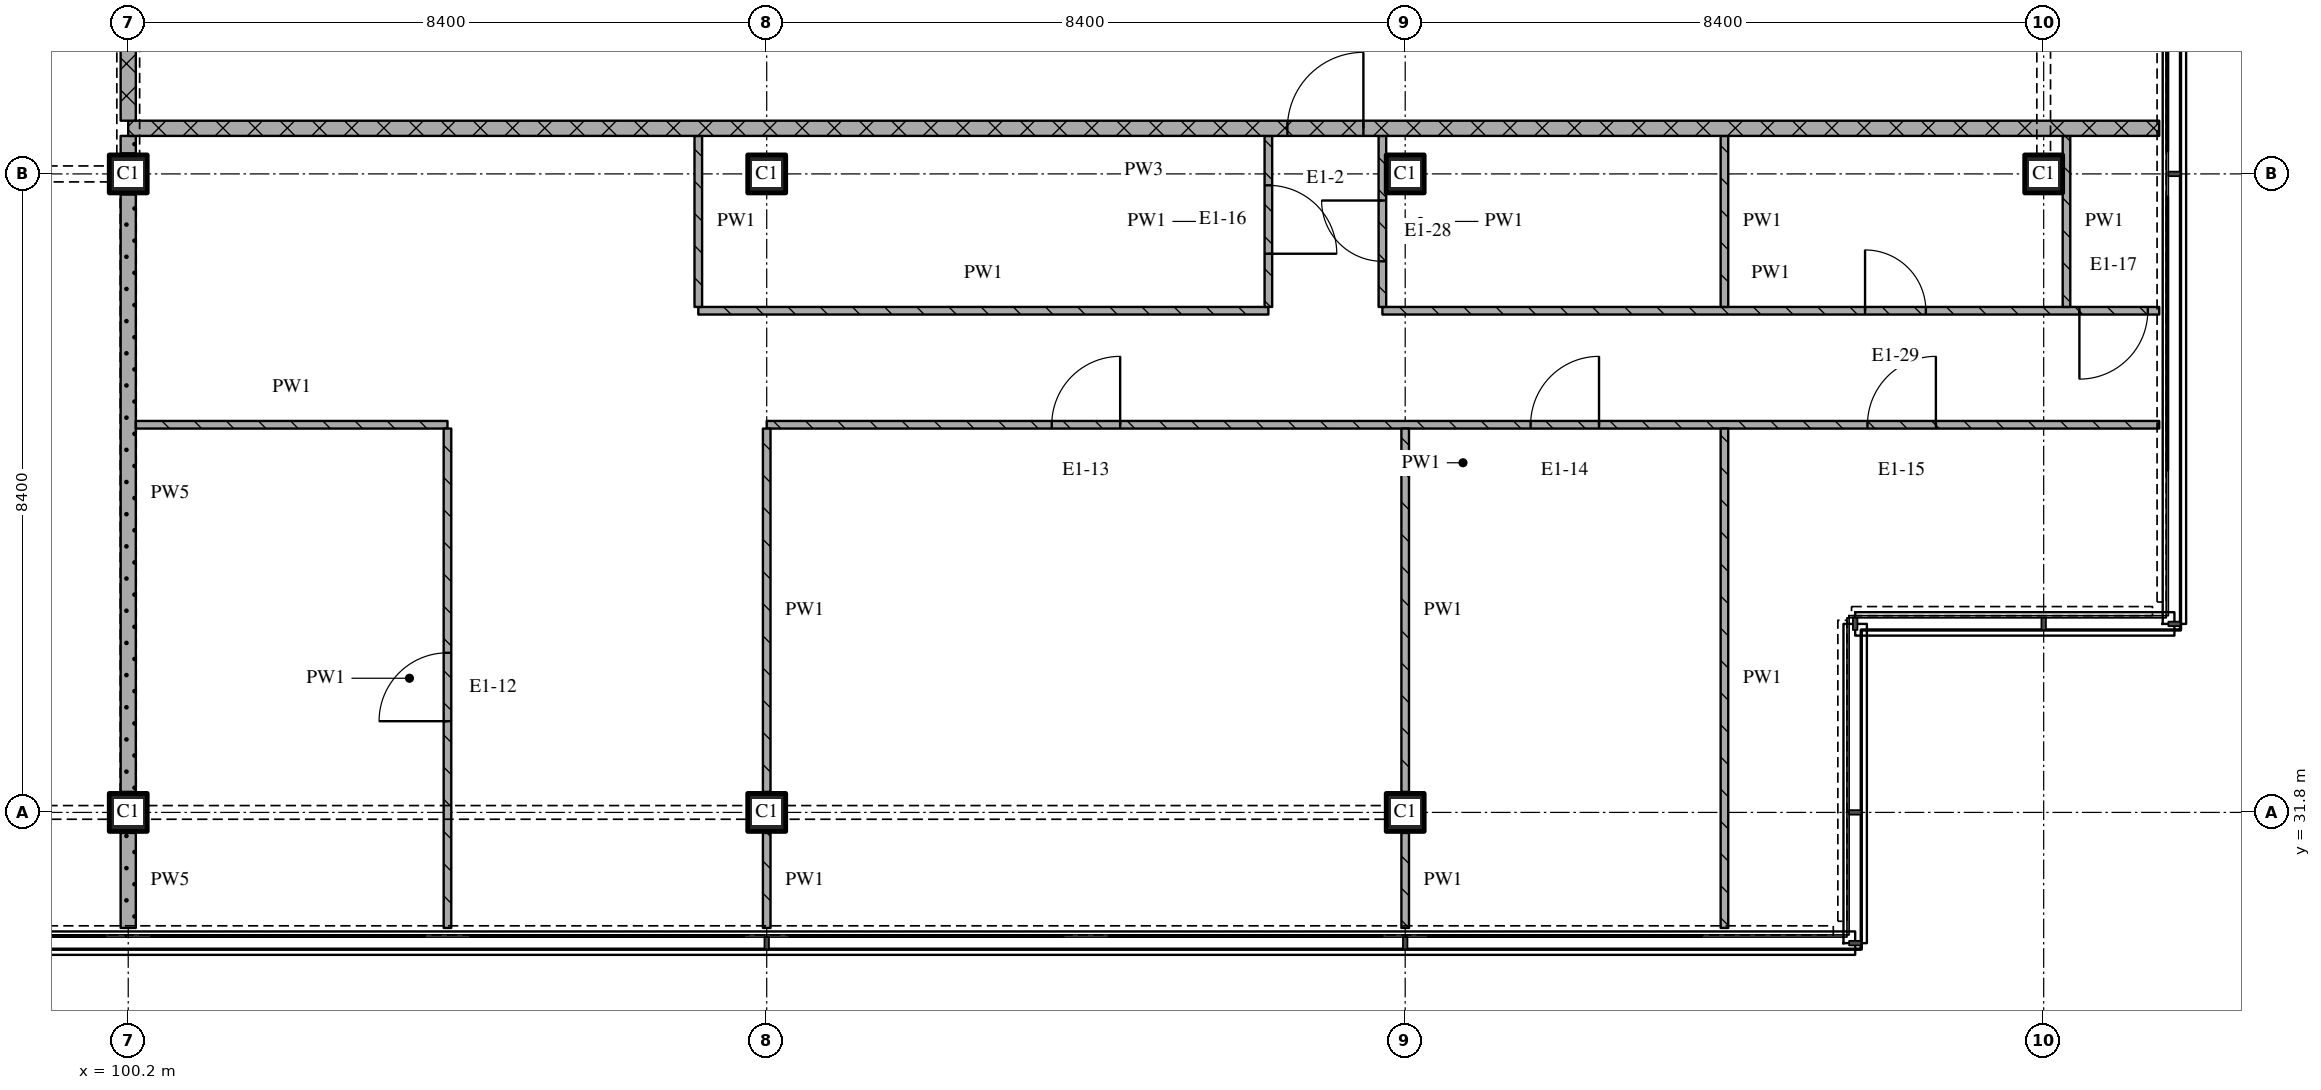
"""IFC4 building model, lengths in metres.
Left out: names, types, materials, properties, quantities, classifications, styles, units other than length and angle.
Written with IfcOpenShell. Run it as: python <this file> out.ifc"""

import sys

from ifc_helpers import new_model, si_unit, direction, frame, frame_2d, origin, origin_2d, place, context, subcontext, project, spatial, rectangle, extrude, element, fill, save


model = new_model("IFC4")
c1 = context("Model", 3, precision=1e-05, world=origin(), true_north=direction((0.0, 1.0)))
c2 = subcontext(c1, "Body", "Model", "MODEL_VIEW")
j1 = project(units=[si_unit("LENGTHUNIT", "METRE"), si_unit("PLANEANGLEUNIT", "RADIAN")], contexts=[c1])
p1 = place(None, origin())
s1 = spatial("IfcSite", under=j1, at=p1, CompositionType="ELEMENT")
p2 = place(p1, origin())
s2 = spatial("IfcBuilding", under=s1, at=p2, CompositionType="ELEMENT")
p3 = place(p2, frame((0.0, 0.0, 267.15)))
s3 = spatial("IfcBuildingStorey", under=s2, at=p3, CompositionType="ELEMENT", Elevation=267.15)
for number, where, z_axis, x_axis in (
    (1, (100.2, 31.8, 0.0), (0.0, 0.0, 1.0), (1.0, 0.0, 0.0)),
    (2, (100.2, 40.2, 0.0), (0.0, 0.0, 1.0), (1.0, 0.0, 0.0)),
    (3, (108.6, 31.8, 0.0), (0.0, 0.0, 1.0), (1.0, 0.0, 0.0)),
    (4, (108.6, 40.2, 0.0), (0.0, 0.0, 1.0), (1.0, 0.0, 0.0)),
    (5, (117.0, 31.8, 0.0), (0.0, 0.0, 1.0), (1.0, 0.0, 0.0)),
    (6, (117.0, 40.2, 0.0), (0.0, 0.0, 1.0), (1.0, 0.0, 0.0)),
    (7, (125.4, 40.2, 0.0), (0.0, 0.0, 1.0), (1.0, 0.0, 0.0)),
):
    element("IfcColumn", number, at=place(p3, frame(where, z_axis=z_axis, x_axis=x_axis)), inside=s3, PredefinedType="COLUMN", context=c2, shape_type="SweptSolid", body=[
        extrude(rectangle(XDim=0.5, YDim=0.5, at=origin_2d()), origin(), (0.0, 0.0, 1.0), 3.6),
    ])
p4 = place(p3, frame((100.3, 36.9, 0.0), z_axis=(0.0, 0.0, 1.0), x_axis=(1.0, 0.0, 0.0)))
e8 = element("IfcWall", 8, at=p4, inside=s3, PredefinedType="PARTITIONING", context=c2, shape_type="SweptSolid", body=[
    extrude(rectangle(XDim=4.1, YDim=0.1, at=frame_2d((2.05, 0.0))), origin(), (0.0, 0.0, 1.0), 3.32),
])
p5 = place(p3, frame((126.92, 36.9, 0.0), z_axis=(0.0, 0.0, 1.0), x_axis=(-1.0, 0.0, 0.0)))
e9 = element("IfcWall", 9, at=p5, inside=s3, PredefinedType="PARTITIONING", context=c2, shape_type="SweptSolid", body=[
    extrude(rectangle(XDim=18.32, YDim=0.1, at=frame_2d((9.16, 0.0))), origin(), (0.0, 0.0, 1.0), 3.32),
])
p6 = place(p5, frame((2.938, 0.0, 0.0)))
e10 = element("IfcOpeningElement", 10, at=p6, cuts=e9, PredefinedType="OPENING", context=c2, shape_type="SweptSolid", body=[
    extrude(rectangle(XDim=0.9, YDim=2.1, at=frame_2d((0.45, 1.05))), frame((0.0, 0.06, 0.0), z_axis=(0.0, -1.0, 0.0), x_axis=(1.0, 0.0, 0.0)), (0.0, 0.0, 1.0), 0.12),
])
p7 = place(p5, frame((7.37, 0.0, 0.0)))
e11 = element("IfcOpeningElement", 11, at=p7, cuts=e9, PredefinedType="OPENING", context=c2, shape_type="SweptSolid", body=[
    extrude(rectangle(XDim=0.9, YDim=2.1, at=frame_2d((0.45, 1.05))), frame((0.0, 0.06, 0.0), z_axis=(0.0, -1.0, 0.0), x_axis=(1.0, 0.0, 0.0)), (0.0, 0.0, 1.0), 0.12),
])
p8 = place(p5, frame((13.67, 0.0, 0.0)))
e12 = element("IfcOpeningElement", 12, at=p8, cuts=e9, PredefinedType="OPENING", context=c2, shape_type="SweptSolid", body=[
    extrude(rectangle(XDim=0.9, YDim=2.1, at=frame_2d((0.45, 1.05))), frame((0.0, 0.06, 0.0), z_axis=(0.0, -1.0, 0.0), x_axis=(1.0, 0.0, 0.0)), (0.0, 0.0, 1.0), 0.12),
])
p9 = place(p3, frame((107.7, 38.4, 0.0), z_axis=(0.0, 0.0, 1.0), x_axis=(1.0, 0.0, 0.0)))
e13 = element("IfcWall", 13, at=p9, inside=s3, PredefinedType="PARTITIONING", context=c2, shape_type="SweptSolid", body=[
    extrude(rectangle(XDim=7.5, YDim=0.1, at=frame_2d((3.75, 0.0))), origin(), (0.0, 0.0, 1.0), 3.32),
])
p10 = place(p3, frame((116.7, 38.4, 0.0), z_axis=(0.0, 0.0, 1.0), x_axis=(1.0, 0.0, 0.0)))
e14 = element("IfcWall", 14, at=p10, inside=s3, PredefinedType="PARTITIONING", context=c2, shape_type="SweptSolid", body=[
    extrude(rectangle(XDim=10.22, YDim=0.1, at=frame_2d((5.11, 0.0))), origin(), (0.0, 0.0, 1.0), 3.32),
])
p11 = place(p10, frame((6.35, 0.0, 0.0)))
e15 = element("IfcOpeningElement", 15, at=p11, cuts=e14, PredefinedType="OPENING", context=c2, shape_type="SweptSolid", body=[
    extrude(rectangle(XDim=0.8, YDim=2.1, at=frame_2d((0.4, 1.05))), frame((0.0, 0.06, 0.0), z_axis=(0.0, -1.0, 0.0), x_axis=(1.0, 0.0, 0.0)), (0.0, 0.0, 1.0), 0.12),
])
p12 = place(p10, frame((9.17, 0.0, 0.0)))
e16 = element("IfcOpeningElement", 16, at=p12, cuts=e14, PredefinedType="OPENING", context=c2, shape_type="SweptSolid", body=[
    extrude(rectangle(XDim=0.9, YDim=2.1, at=frame_2d((0.45, 1.05))), frame((0.0, 0.06, 0.0), z_axis=(0.0, -1.0, 0.0), x_axis=(1.0, 0.0, 0.0)), (0.0, 0.0, 1.0), 0.12),
])
p13 = place(p3, frame((126.92, 40.8, 0.0), z_axis=(0.0, 0.0, 1.0), x_axis=(-1.0, 0.0, 0.0)))
e17 = element("IfcWall", 17, at=p13, inside=s3, PredefinedType="PARTITIONING", context=c2, shape_type="SweptSolid", body=[
    extrude(rectangle(XDim=26.72, YDim=0.2, at=frame_2d((13.36, 0.0))), origin(), (0.0, 0.0, 1.0), 3.32),
])
p14 = place(p13, frame((10.47, 0.0, 0.0)))
e18 = element("IfcOpeningElement", 18, at=p14, cuts=e17, PredefinedType="OPENING", context=c2, shape_type="SweptSolid", body=[
    extrude(rectangle(XDim=1.0, YDim=2.1, at=frame_2d((0.5, 1.05))), frame((0.0, 0.11, 0.0), z_axis=(0.0, -1.0, 0.0), x_axis=(1.0, 0.0, 0.0)), (0.0, 0.0, 1.0), 0.22),
])
p15 = place(p3, frame((100.2, 43.1, 0.0), z_axis=(0.0, 0.0, 1.0), x_axis=(0.0, -1.0, 0.0)))
e19 = element("IfcWall", 19, at=p15, inside=s3, PredefinedType="PARTITIONING", context=c2, shape_type="SweptSolid", body=[
    extrude(rectangle(XDim=2.2, YDim=0.2, at=frame_2d((1.1, 0.0))), origin(), (0.0, 0.0, 1.0), 2.53),
])
p16 = place(p3, frame((100.2, 31.53, 0.0), z_axis=(0.0, 0.0, 1.0), x_axis=(0.0, -1.0, 0.0)))
e20 = element("IfcWall", 20, at=p16, inside=s3, PredefinedType="PARTITIONING", context=c2, shape_type="SweptSolid", body=[
    extrude(rectangle(XDim=1.25, YDim=0.2, at=frame_2d((0.625, 0.0))), origin(), (0.0, 0.0, 1.0), 3.32),
])
p17 = place(p3, frame((100.2, 39.93, 0.0), z_axis=(0.0, 0.0, 1.0), x_axis=(0.0, -1.0, 0.0)))
e21 = element("IfcWall", 21, at=p17, inside=s3, PredefinedType="PARTITIONING", context=c2, shape_type="SweptSolid", body=[
    extrude(rectangle(XDim=7.86, YDim=0.2, at=frame_2d((3.93, 0.0))), origin(), (0.0, 0.0, 1.0), 2.77),
])
p18 = place(p3, frame((100.2, 40.7, 0.0), z_axis=(0.0, 0.0, 1.0), x_axis=(0.0, -1.0, 0.0)))
e22 = element("IfcWall", 22, at=p18, inside=s3, PredefinedType="PARTITIONING", context=c2, shape_type="SweptSolid", body=[
    extrude(rectangle(XDim=0.23, YDim=0.2, at=frame_2d((0.115, 0.0))), origin(), (0.0, 0.0, 1.0), 3.32),
])
p19 = place(p3, frame((104.4, 30.28, 0.0), z_axis=(0.0, 0.0, 1.0), x_axis=(0.0, 1.0, 0.0)))
e23 = element("IfcWall", 23, at=p19, inside=s3, PredefinedType="PARTITIONING", context=c2, shape_type="SweptSolid", body=[
    extrude(rectangle(XDim=6.57, YDim=0.1, at=frame_2d((3.285, 0.0))), origin(), (0.0, 0.0, 1.0), 3.32),
])
p20 = place(p19, frame((2.72, 0.0, 0.0)))
e24 = element("IfcOpeningElement", 24, at=p20, cuts=e23, PredefinedType="OPENING", context=c2, shape_type="SweptSolid", body=[
    extrude(rectangle(XDim=0.9, YDim=2.1, at=frame_2d((0.45, 1.05))), frame((0.0, 0.06, 0.0), z_axis=(0.0, -1.0, 0.0), x_axis=(1.0, 0.0, 0.0)), (0.0, 0.0, 1.0), 0.12),
])
p21 = place(p3, frame((107.7, 40.7, 0.0), z_axis=(0.0, 0.0, 1.0), x_axis=(0.0, -1.0, 0.0)))
e25 = element("IfcWall", 25, at=p21, inside=s3, PredefinedType="PARTITIONING", context=c2, shape_type="SweptSolid", body=[
    extrude(rectangle(XDim=2.25, YDim=0.1, at=frame_2d((1.125, 0.0))), origin(), (0.0, 0.0, 1.0), 3.32),
])
p22 = place(p3, frame((108.6, 31.53, 0.0), z_axis=(0.0, 0.0, 1.0), x_axis=(0.0, -1.0, 0.0)))
e26 = element("IfcWall", 26, at=p22, inside=s3, PredefinedType="PARTITIONING", context=c2, shape_type="SweptSolid", body=[
    extrude(rectangle(XDim=1.25, YDim=0.1, at=frame_2d((0.625, 0.0))), origin(), (0.0, 0.0, 1.0), 3.32),
])
p23 = place(p3, frame((108.6, 36.85, 0.0), z_axis=(0.0, 0.0, 1.0), x_axis=(0.0, -1.0, 0.0)))
e27 = element("IfcWall", 27, at=p23, inside=s3, PredefinedType="PARTITIONING", context=c2, shape_type="SweptSolid", body=[
    extrude(rectangle(XDim=4.78, YDim=0.1, at=frame_2d((2.39, 0.0))), origin(), (0.0, 0.0, 1.0), 3.32),
])
p24 = place(p3, frame((115.2, 38.45, 0.0), z_axis=(0.0, 0.0, 1.0), x_axis=(0.0, 1.0, 0.0)))
e28 = element("IfcWall", 28, at=p24, inside=s3, PredefinedType="PARTITIONING", context=c2, shape_type="SweptSolid", body=[
    extrude(rectangle(XDim=2.25, YDim=0.1, at=frame_2d((1.125, 0.0))), origin(), (0.0, 0.0, 1.0), 3.32),
])
p25 = place(p24, frame((0.7, 0.0, 0.0)))
e29 = element("IfcOpeningElement", 29, at=p25, cuts=e28, PredefinedType="OPENING", context=c2, shape_type="SweptSolid", body=[
    extrude(rectangle(XDim=0.9, YDim=2.1, at=frame_2d((0.45, 1.05))), frame((0.0, 0.06, 0.0), z_axis=(0.0, -1.0, 0.0), x_axis=(1.0, 0.0, 0.0)), (0.0, 0.0, 1.0), 0.12),
])
p26 = place(p3, frame((116.7, 40.7, 0.0), z_axis=(0.0, 0.0, 1.0), x_axis=(0.0, -1.0, 0.0)))
e30 = element("IfcWall", 30, at=p26, inside=s3, PredefinedType="PARTITIONING", context=c2, shape_type="SweptSolid", body=[
    extrude(rectangle(XDim=2.25, YDim=0.1, at=frame_2d((1.125, 0.0))), origin(), (0.0, 0.0, 1.0), 3.32),
])
p27 = place(p26, frame((0.85, 0.0, 0.0)))
e31 = element("IfcOpeningElement", 31, at=p27, cuts=e30, PredefinedType="OPENING", context=c2, shape_type="SweptSolid", body=[
    extrude(rectangle(XDim=0.8, YDim=2.1, at=frame_2d((0.4, 1.05))), frame((0.0, 0.06, 0.0), z_axis=(0.0, -1.0, 0.0), x_axis=(1.0, 0.0, 0.0)), (0.0, 0.0, 1.0), 0.12),
])
p28 = place(p3, frame((117.0, 31.53, 0.0), z_axis=(0.0, 0.0, 1.0), x_axis=(0.0, -1.0, 0.0)))
e32 = element("IfcWall", 32, at=p28, inside=s3, PredefinedType="PARTITIONING", context=c2, shape_type="SweptSolid", body=[
    extrude(rectangle(XDim=1.25, YDim=0.1, at=frame_2d((0.625, 0.0))), origin(), (0.0, 0.0, 1.0), 3.32),
])
p29 = place(p3, frame((117.0, 36.85, 0.0), z_axis=(0.0, 0.0, 1.0), x_axis=(0.0, -1.0, 0.0)))
e33 = element("IfcWall", 33, at=p29, inside=s3, PredefinedType="PARTITIONING", context=c2, shape_type="SweptSolid", body=[
    extrude(rectangle(XDim=4.78, YDim=0.1, at=frame_2d((2.39, 0.0))), origin(), (0.0, 0.0, 1.0), 2.83),
])
p30 = place(p3, frame((121.2, 36.85, 0.0), z_axis=(0.0, 0.0, 1.0), x_axis=(0.0, -1.0, 0.0)))
e34 = element("IfcWall", 34, at=p30, inside=s3, PredefinedType="PARTITIONING", context=c2, shape_type="SweptSolid", body=[
    extrude(rectangle(XDim=6.57, YDim=0.1, at=frame_2d((3.285, 0.0))), origin(), (0.0, 0.0, 1.0), 3.32),
])
for number, where, z_axis, x_axis in (
    (35, (121.2, 40.7, 0.0), (0.0, 0.0, 1.0), (0.0, -1.0, 0.0)),
    (36, (125.7, 40.7, 0.0), (0.0, 0.0, 1.0), (0.0, -1.0, 0.0)),
):
    element("IfcWall", number, at=place(p3, frame(where, z_axis=z_axis, x_axis=x_axis)), inside=s3, PredefinedType="PARTITIONING", context=c2, shape_type="SweptSolid", body=[
        extrude(rectangle(XDim=2.25, YDim=0.1, at=frame_2d((1.125, 0.0))), origin(), (0.0, 0.0, 1.0), 3.32),
    ])
p31 = place(p6, origin())
e37 = element("IfcDoor", 37, at=p31, inside=s3, OperationType="SINGLE_SWING_RIGHT", PredefinedType="DOOR", context=c2, shape_type="SweptSolid", body=[
    extrude(rectangle(XDim=0.9, YDim=2.1, at=frame_2d((0.45, 1.05))), frame((0.0, 0.025, 0.0), z_axis=(0.0, -1.0, 0.0), x_axis=(1.0, 0.0, 0.0)), (0.0, 0.0, 1.0), 0.05),
])
fill(e10, e37)
p32 = place(p7, origin())
e38 = element("IfcDoor", 38, at=p32, inside=s3, OperationType="SINGLE_SWING_RIGHT", PredefinedType="DOOR", context=c2, shape_type="SweptSolid", body=[
    extrude(rectangle(XDim=0.9, YDim=2.1, at=frame_2d((0.45, 1.05))), frame((0.0, 0.025, 0.0), z_axis=(0.0, -1.0, 0.0), x_axis=(1.0, 0.0, 0.0)), (0.0, 0.0, 1.0), 0.05),
])
fill(e11, e38)
p33 = place(p8, origin())
e39 = element("IfcDoor", 39, at=p33, inside=s3, OperationType="SINGLE_SWING_RIGHT", PredefinedType="DOOR", context=c2, shape_type="SweptSolid", body=[
    extrude(rectangle(XDim=0.9, YDim=2.1, at=frame_2d((0.45, 1.05))), frame((0.0, 0.025, 0.0), z_axis=(0.0, -1.0, 0.0), x_axis=(1.0, 0.0, 0.0)), (0.0, 0.0, 1.0), 0.05),
])
fill(e12, e39)
p34 = place(p11, origin())
e40 = element("IfcDoor", 40, at=p34, inside=s3, OperationType="SINGLE_SWING_LEFT", PredefinedType="DOOR", context=c2, shape_type="SweptSolid", body=[
    extrude(rectangle(XDim=0.8, YDim=2.1, at=frame_2d((0.4, 1.05))), frame((0.0, 0.025, 0.0), z_axis=(0.0, -1.0, 0.0), x_axis=(1.0, 0.0, 0.0)), (0.0, 0.0, 1.0), 0.05),
])
fill(e15, e40)
p35 = place(p12, origin())
e41 = element("IfcDoor", 41, at=p35, inside=s3, OperationType="SINGLE_SWING_RIGHT", PredefinedType="DOOR", context=c2, shape_type="SweptSolid", body=[
    extrude(rectangle(XDim=0.9, YDim=2.1, at=frame_2d((0.45, 1.05))), frame((0.0, 0.025, 0.0), z_axis=(0.0, -1.0, 0.0), x_axis=(1.0, 0.0, 0.0)), (0.0, 0.0, 1.0), 0.05),
])
fill(e16, e41)
p36 = place(p14, origin())
e42 = element("IfcDoor", 42, at=p36, inside=s3, OperationType="SINGLE_SWING_RIGHT", PredefinedType="DOOR", context=c2, shape_type="SweptSolid", body=[
    extrude(rectangle(XDim=1.0, YDim=2.1, at=frame_2d((0.5, 1.05))), frame((0.0, 0.025, 0.0), z_axis=(0.0, -1.0, 0.0), x_axis=(1.0, 0.0, 0.0)), (0.0, 0.0, 1.0), 0.05),
])
fill(e18, e42)
p37 = place(p20, origin())
e43 = element("IfcDoor", 43, at=p37, inside=s3, OperationType="SINGLE_SWING_LEFT", PredefinedType="DOOR", context=c2, shape_type="SweptSolid", body=[
    extrude(rectangle(XDim=0.9, YDim=2.1, at=frame_2d((0.45, 1.05))), frame((0.0, 0.025, 0.0), z_axis=(0.0, -1.0, 0.0), x_axis=(1.0, 0.0, 0.0)), (0.0, 0.0, 1.0), 0.05),
])
fill(e24, e43)
p38 = place(p25, origin())
e44 = element("IfcDoor", 44, at=p38, inside=s3, OperationType="SINGLE_SWING_RIGHT", PredefinedType="DOOR", context=c2, shape_type="SweptSolid", body=[
    extrude(rectangle(XDim=0.9, YDim=2.1, at=frame_2d((0.45, 1.05))), frame((0.0, 0.025, 0.0), z_axis=(0.0, -1.0, 0.0), x_axis=(1.0, 0.0, 0.0)), (0.0, 0.0, 1.0), 0.05),
])
fill(e29, e44)
p39 = place(p27, origin())
e45 = element("IfcDoor", 45, at=p39, inside=s3, OperationType="SINGLE_SWING_RIGHT", PredefinedType="DOOR", context=c2, shape_type="SweptSolid", body=[
    extrude(rectangle(XDim=0.8, YDim=2.1, at=frame_2d((0.4, 1.05))), frame((0.0, 0.025, 0.0), z_axis=(0.0, -1.0, 0.0), x_axis=(1.0, 0.0, 0.0)), (0.0, 0.0, 1.0), 0.05),
])
fill(e31, e45)
save(model, sys.argv[1])
